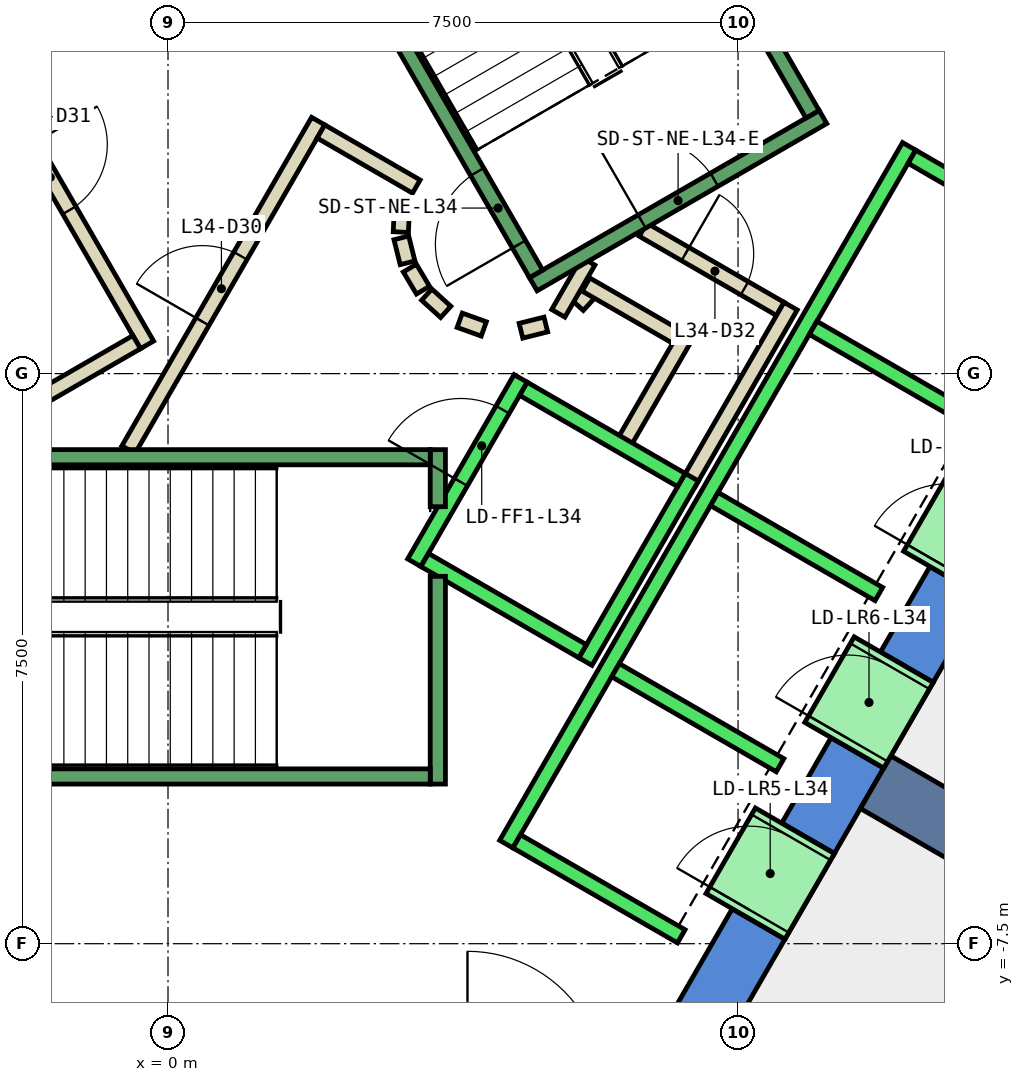
"""IFC4 building model, lengths in metres.
Left out: names, types, materials, properties, quantities, classifications, styles, units other than length and angle.
Written with IfcOpenShell. Run it as: python <this file> out.ifc"""

import sys

from ifc_helpers import new_model, si_unit, direction, frame, frame_2d, origin, place, context, subcontext, project, spatial, polyline, rectangle, outline, extrude, element, fill, save


model = new_model("IFC4")
c1 = context("Model", 3, precision=1e-05, world=origin(), true_north=direction((0.0, 1.0)))
c2 = subcontext(c1, "Body", "Model", "MODEL_VIEW")
j1 = project(units=[si_unit("LENGTHUNIT", "METRE"), si_unit("PLANEANGLEUNIT", "RADIAN")], contexts=[c1])
p1 = place(None, origin())
s1 = spatial("IfcSite", under=j1, at=p1, CompositionType="ELEMENT")
p2 = place(p1, origin())
s2 = spatial("IfcBuilding", under=s1, at=p2, CompositionType="ELEMENT")
p3 = place(p2, frame((0.0, 0.0, 155.0)))
s3 = spatial("IfcBuildingStorey", under=s2, at=p3, CompositionType="ELEMENT", Elevation=155.0)
p4 = place(p3, frame((0.0, 0.0, -0.4)))
e1 = element("IfcWall", 1, at=p4, inside=s3, PredefinedType="SHEAR", context=c2, shape_type="SweptSolid", body=[
    extrude(outline(polyline([(8.517, 11.748), (7.824, 11.348), (12.933, 2.5), (13.856, 2.5), (8.517, 11.748)])), origin(), (0.0, 0.0, 1.0), 4.2),
])
p5 = place(p3, frame((0.0, 0.0, -0.4)))
e2 = element("IfcWall", 2, at=p5, inside=s3, PredefinedType="SHEAR", context=c2, shape_type="SweptSolid", body=[
    extrude(outline(polyline([(8.117, -7.44), (7.424, -7.04), (6.466, -8.7), (6.928, -9.5), (8.117, -7.44)])), origin(), (0.0, 0.0, 1.0), 4.2),
])
p6 = place(p3, frame((0.0, 0.0, -0.4)))
e3 = element("IfcWall", 3, at=p6, inside=s3, PredefinedType="SHEAR", context=c2, shape_type="SweptSolid", body=[
    extrude(outline(polyline([(9.417, -5.189), (8.724, -4.789), (8.075, -5.914), (8.767, -6.314), (9.417, -5.189)])), origin(), (0.0, 0.0, 1.0), 4.2),
])
p7 = place(p3, frame((0.0, 0.0, -0.4)))
e4 = element("IfcWall", 4, at=p7, inside=s3, PredefinedType="SHEAR", context=c2, shape_type="SweptSolid", body=[
    extrude(outline(polyline([(10.717, -2.937), (10.025, -2.537), (9.374, -3.663), (10.067, -4.063), (10.717, -2.937)])), origin(), (0.0, 0.0, 1.0), 4.2),
])
p8 = place(p3, frame((0.0, 0.0, 3.6)))
e5 = element("IfcWall", 5, at=p8, inside=s3, PredefinedType="SHEAR", context=c2, shape_type="SweptSolid", body=[
    extrude(outline(polyline([(8.767, -6.314), (8.075, -5.914), (7.424, -7.04), (8.117, -7.44), (8.767, -6.314)])), origin(), (0.0, 0.0, 1.0), 0.2),
])
p9 = place(p3, frame((0.0, 0.0, 3.6)))
e6 = element("IfcWall", 6, at=p9, inside=s3, PredefinedType="SHEAR", context=c2, shape_type="SweptSolid", body=[
    extrude(outline(polyline([(10.067, -4.063), (9.374, -3.663), (8.724, -4.789), (9.417, -5.189), (10.067, -4.063)])), origin(), (0.0, 0.0, 1.0), 0.2),
])
p10 = place(p3, frame((0.0, 0.0, 3.6)))
e7 = element("IfcWall", 7, at=p10, inside=s3, PredefinedType="SHEAR", context=c2, shape_type="SweptSolid", body=[
    extrude(outline(polyline([(11.367, -1.811), (10.675, -1.411), (10.025, -2.537), (10.717, -2.937), (11.367, -1.811)])), origin(), (0.0, 0.0, 1.0), 0.2),
])
p11 = place(p3, frame((9.31, -5.375, -0.4), z_axis=(0.0, 0.0, 1.0), x_axis=(0.866017533419, -0.500013631625, 0.0)))
e8 = element("IfcWall", 8, at=p11, inside=s3, PredefinedType="SHEAR", context=c2, shape_type="SweptSolid", body=[
    extrude(rectangle(XDim=9.0, YDim=0.8, at=frame_2d((4.5, 0.0))), origin(), (0.0, 0.0, 1.0), 4.2),
])
p12 = place(p3, frame((5.39, 0.898, 0.0), z_axis=(0.0, 0.0, 1.0), x_axis=(0.673828488714, 0.738887791073, 0.0)))
e9 = element("IfcWall", 9, at=p12, inside=s3, PredefinedType="PARTITIONING", context=c2, shape_type="SweptSolid", body=[
    extrude(rectangle(XDim=0.263, YDim=0.2, at=frame_2d((0.131, 0.0))), origin(), (0.0, 0.0, 1.0), 3.8),
])
p13 = place(p3, frame((5.499, 1.172, 0.0), z_axis=(0.0, 0.0, 1.0), x_axis=(0.866333505267, -0.499465972466, 0.0)))
e10 = element("IfcWall", 10, at=p13, inside=s3, PredefinedType="PARTITIONING", context=c2, shape_type="SweptSolid", body=[
    extrude(rectangle(XDim=1.374, YDim=0.2, at=frame_2d((0.687, 0.0))), origin(), (0.0, 0.0, 1.0), 3.8),
])
p14 = place(p3, frame((6.826, 0.522, 0.0), z_axis=(0.0, 0.0, 1.0), x_axis=(-0.500016722714, -0.866015748706, 0.0)))
e11 = element("IfcWall", 11, at=p14, inside=s3, PredefinedType="PARTITIONING", context=c2, shape_type="SweptSolid", body=[
    extrude(rectangle(XDim=1.7, YDim=0.2, at=frame_2d((0.85, 0.0))), origin(), (0.0, 0.0, 1.0), 3.8),
])
p15 = place(p3, frame((6.25, 1.894, 0.0), z_axis=(0.0, 0.0, 1.0), x_axis=(0.866043184279, -0.499969202016, 0.0)))
e12 = element("IfcWall", 12, at=p15, inside=s3, PredefinedType="PARTITIONING", context=c2, shape_type="SweptSolid", body=[
    extrude(rectangle(XDim=2.084, YDim=0.2, at=frame_2d((1.042, 0.0))), origin(), (0.0, 0.0, 1.0), 3.8),
])
p16 = place(p15, frame((0.642, 0.0, 0.0)))
e13 = element("IfcOpeningElement", 13, at=p16, cuts=e12, PredefinedType="OPENING", context=c2, shape_type="SweptSolid", body=[
    extrude(rectangle(XDim=0.9, YDim=2.1, at=frame_2d((0.45, 1.05))), frame((0.0, 0.11, 0.0), z_axis=(0.0, -1.0, 0.0), x_axis=(1.0, 0.0, 0.0)), (0.0, 0.0, 1.0), 0.22),
])
p17 = place(p3, frame((8.192, 0.888, 0.0), z_axis=(0.0, 0.0, 1.0), x_axis=(-0.499940625693, -0.866059680843, 0.0)))
e14 = element("IfcWall", 14, at=p17, inside=s3, PredefinedType="PARTITIONING", context=c2, shape_type="SweptSolid", body=[
    extrude(rectangle(XDim=2.68, YDim=0.2, at=frame_2d((1.34, 0.0))), origin(), (0.0, 0.0, 1.0), 3.8),
])
p18 = place(p3, frame((5.135, 0.793, 0.0), z_axis=(0.0, 0.0, 1.0), x_axis=(0.499526442893, 0.866298639529, 0.0)))
e15 = element("IfcWall", 15, at=p18, inside=s3, PredefinedType="PARTITIONING", context=c2, shape_type="SweptSolid", body=[
    extrude(rectangle(XDim=0.791, YDim=0.2, at=frame_2d((0.396, 0.0))), origin(), (0.0, 0.0, 1.0), 3.8),
])
p19 = place(p3, frame((-0.52, -1.0, 0.0), z_axis=(0.0, 0.0, 1.0), x_axis=(0.50011622646, 0.865958290007, 0.0)))
e16 = element("IfcWall", 16, at=p19, inside=s3, PredefinedType="PARTITIONING", context=c2, shape_type="SweptSolid", body=[
    extrude(rectangle(XDim=4.991, YDim=0.2, at=frame_2d((2.496, 0.0))), origin(), (0.0, 0.0, 1.0), 3.8),
])
p20 = place(p19, frame((1.945, 0.0, 0.0)))
e17 = element("IfcOpeningElement", 17, at=p20, cuts=e16, PredefinedType="OPENING", context=c2, shape_type="SweptSolid", body=[
    extrude(rectangle(XDim=1.0, YDim=2.1, at=frame_2d((0.5, 1.05))), frame((0.0, 0.11, 0.0), z_axis=(0.0, -1.0, 0.0), x_axis=(1.0, 0.0, 0.0)), (0.0, 0.0, 1.0), 0.22),
])
p21 = place(p3, frame((2.012, 3.186, 0.0), z_axis=(0.0, 0.0, 1.0), x_axis=(0.865891012941, -0.500232699559, 0.0)))
e18 = element("IfcWall", 18, at=p21, inside=s3, PredefinedType="PARTITIONING", context=c2, shape_type="SweptSolid", body=[
    extrude(rectangle(XDim=1.449, YDim=0.2, at=frame_2d((0.725, 0.0))), origin(), (0.0, 0.0, 1.0), 3.8),
])
p22 = place(p3, frame((3.079, 2.199, 0.0), z_axis=(0.0, 0.0, 1.0), x_axis=(-0.047771483479, -0.998858290933, 0.0)))
e19 = element("IfcWall", 19, at=p22, inside=s3, PredefinedType="PARTITIONING", context=c2, shape_type="SweptSolid", body=[
    extrude(rectangle(XDim=0.337, YDim=0.2, at=frame_2d((0.169, 0.0))), origin(), (0.0, 0.0, 1.0), 3.8),
])
p23 = place(p3, frame((3.07, 1.786, 0.0), z_axis=(0.0, 0.0, 1.0), x_axis=(0.242705583207, -0.970099994784, 0.0)))
e20 = element("IfcWall", 20, at=p23, inside=s3, PredefinedType="PARTITIONING", context=c2, shape_type="SweptSolid", body=[
    extrude(rectangle(XDim=0.338, YDim=0.2, at=frame_2d((0.169, 0.0))), origin(), (0.0, 0.0, 1.0), 3.8),
])
for number, where, z_axis, x_axis in (
    (21, (3.182, 1.388, 0.0), (0.0, 0.0, 1.0), (0.512, -0.859, 0.0)),
    (22, (3.404, 1.039, 0.0), (0.0, 0.0, 1.0), (0.74, -0.672, 0.0)),
):
    element("IfcWall", number, at=place(p3, frame(where, z_axis=z_axis, x_axis=x_axis)), inside=s3, PredefinedType="PARTITIONING", context=c2, shape_type="SweptSolid", body=[
        extrude(rectangle(XDim=0.338, YDim=0.2, at=frame_2d((0.169, 0.0))), origin(), (0.0, 0.0, 1.0), 3.8),
    ])
p24 = place(p3, frame((3.838, 0.702, 0.0), z_axis=(0.0, 0.0, 1.0), x_axis=(0.941035081519, -0.338308993895, 0.0)))
e23 = element("IfcWall", 23, at=p24, inside=s3, PredefinedType="PARTITIONING", context=c2, shape_type="SweptSolid", body=[
    extrude(rectangle(XDim=0.337, YDim=0.2, at=frame_2d((0.168, 0.0))), origin(), (0.0, 0.0, 1.0), 3.8),
])
p25 = place(p3, frame((4.644, 0.564, 0.0), z_axis=(0.0, 0.0, 1.0), x_axis=(0.969929076366, 0.243387729394, 0.0)))
e24 = element("IfcWall", 24, at=p25, inside=s3, PredefinedType="PARTITIONING", context=c2, shape_type="SweptSolid", body=[
    extrude(rectangle(XDim=0.337, YDim=0.2, at=frame_2d((0.168, 0.0))), origin(), (0.0, 0.0, 1.0), 3.8),
])
p26 = place(p3, frame((-2.771, 4.7, 0.0), z_axis=(0.0, 0.0, 1.0), x_axis=(0.499969479948, -0.866043023828, 0.0)))
e25 = element("IfcWall", 25, at=p26, inside=s3, PredefinedType="PARTITIONING", context=c2, shape_type="SweptSolid", body=[
    extrude(rectangle(XDim=4.99, YDim=0.2, at=frame_2d((2.495, 0.0))), origin(), (0.0, 0.0, 1.0), 3.8),
])
p27 = place(p26, frame((1.945, 0.0, 0.0)))
e26 = element("IfcOpeningElement", 26, at=p27, cuts=e25, PredefinedType="OPENING", context=c2, shape_type="SweptSolid", body=[
    extrude(rectangle(XDim=1.0, YDim=2.1, at=frame_2d((0.5, 1.05))), frame((0.0, 0.11, 0.0), z_axis=(0.0, -1.0, 0.0), x_axis=(1.0, 0.0, 0.0)), (0.0, 0.0, 1.0), 0.22),
])
p28 = place(p3, frame((-0.412, 0.414, 0.0), z_axis=(0.0, 0.0, 1.0), x_axis=(-0.866017369001, -0.500013916395, 0.0)))
e27 = element("IfcWall", 27, at=p28, inside=s3, PredefinedType="PARTITIONING", context=c2, shape_type="SweptSolid", body=[
    extrude(rectangle(XDim=1.45, YDim=0.2, at=frame_2d((0.725, 0.0))), origin(), (0.0, 0.0, 1.0), 3.8),
])
p29 = place(p3, frame((12.401, -7.621, 0.0), z_axis=(0.0, 0.0, 1.0), x_axis=(-0.499983724212, -0.866034800411, 0.0)))
e28 = element("IfcWall", 28, at=p29, inside=s3, PredefinedType="PARTITIONING", context=c2, shape_type="SweptSolid", body=[
    extrude(rectangle(XDim=9.302, YDim=0.2, at=frame_2d((4.651, 0.0))), origin(), (0.0, 0.0, 1.0), 3.8),
])
p30 = place(p3, frame((3.24, -2.488, 0.0), z_axis=(0.0, 0.0, 1.0), x_axis=(0.49994636267, 0.866056369097, 0.0)))
e29 = element("IfcWall", 29, at=p30, inside=s3, PredefinedType="STANDARD", context=c2, shape_type="SweptSolid", body=[
    extrude(rectangle(XDim=2.8, YDim=0.2, at=frame_2d((1.4, 0.0))), origin(), (0.0, 0.0, 1.0), 3.8),
])
p31 = place(p30, frame((1.225, 0.0, 0.0)))
e30 = element("IfcOpeningElement", 30, at=p31, cuts=e29, PredefinedType="OPENING", context=c2, shape_type="SweptSolid", body=[
    extrude(rectangle(XDim=1.1, YDim=2.1, at=frame_2d((0.55, 1.05))), frame((0.0, 0.11, 0.0), z_axis=(0.0, -1.0, 0.0), x_axis=(1.0, 0.0, 0.0)), (0.0, 0.0, 1.0), 0.22),
])
p32 = place(p3, frame((5.492, -3.788, 0.0), z_axis=(0.0, 0.0, 1.0), x_axis=(0.500011755427, 0.866018616679, 0.0)))
e31 = element("IfcWall", 31, at=p32, inside=s3, PredefinedType="STANDARD", context=c2, shape_type="SweptSolid", body=[
    extrude(rectangle(XDim=2.8, YDim=0.2, at=frame_2d((1.4, 0.0))), origin(), (0.0, 0.0, 1.0), 3.8),
])
p33 = place(p3, frame((3.377, -2.452, 0.0), z_axis=(0.0, 0.0, 1.0), x_axis=(0.865955154139, -0.50012165622, 0.0)))
e32 = element("IfcWall", 32, at=p33, inside=s3, PredefinedType="STANDARD", context=c2, shape_type="SweptSolid", body=[
    extrude(rectangle(XDim=2.4, YDim=0.2, at=frame_2d((1.2, 0.0))), origin(), (0.0, 0.0, 1.0), 3.8),
])
p34 = place(p3, frame((4.677, -0.2, 0.0), z_axis=(0.0, 0.0, 1.0), x_axis=(0.865973769406, -0.500089422704, 0.0)))
e33 = element("IfcWall", 33, at=p34, inside=s3, PredefinedType="STANDARD", context=c2, shape_type="SweptSolid", body=[
    extrude(rectangle(XDim=2.399, YDim=0.2, at=frame_2d((1.2, 0.0))), origin(), (0.0, 0.0, 1.0), 3.8),
])
p35 = place(p3, frame((4.451, -6.19, 0.0), z_axis=(0.0, 0.0, 1.0), x_axis=(0.50000090737, 0.866024879913, 0.0)))
e34 = element("IfcWall", 34, at=p35, inside=s3, PredefinedType="STANDARD", context=c2, shape_type="SweptSolid", body=[
    extrude(rectangle(XDim=10.6, YDim=0.2, at=frame_2d((5.3, 0.0))), origin(), (0.0, 0.0, 1.0), 3.8),
])
for number, where, z_axis, x_axis in (
    (35, (4.588, -6.153, 0.0), (0.0, 0.0, 1.0), (0.866, -0.5, 0.0)),
    (36, (5.888, -3.902, 0.0), (0.0, 0.0, 1.0), (0.866, -0.5, 0.0)),
    (37, (7.188, -1.65, 0.0), (0.0, 0.0, 1.0), (0.866, -0.5, 0.0)),
    (38, (8.488, 0.602, 0.0), (0.0, 0.0, 1.0), (0.866, -0.5, 0.0)),
):
    element("IfcWall", number, at=place(p3, frame(where, z_axis=z_axis, x_axis=x_axis)), inside=s3, PredefinedType="STANDARD", context=c2, shape_type="SweptSolid", body=[
        extrude(rectangle(XDim=2.5, YDim=0.2, at=frame_2d((1.25, 0.0))), origin(), (0.0, 0.0, 1.0), 3.8),
    ])
p36 = place(p3, frame((9.788, 2.853, 0.0), z_axis=(0.0, 0.0, 1.0), x_axis=(0.865998541277, -0.500046524342, 0.0)))
e39 = element("IfcWall", 39, at=p36, inside=s3, PredefinedType="STANDARD", context=c2, shape_type="SweptSolid", body=[
    extrude(rectangle(XDim=2.5, YDim=0.2, at=frame_2d((1.25, 0.0))), origin(), (0.0, 0.0, 1.0), 3.8),
])
p37 = place(p3, frame((7.598, -7.14, 0.0), z_axis=(0.0, 0.0, 1.0), x_axis=(0.500362116554, 0.865816234728, 0.0)))
e40 = element("IfcWall", 40, at=p37, inside=s3, PredefinedType="STANDARD", context=c2, shape_type="SweptSolid", body=[
    extrude(rectangle(XDim=1.299, YDim=1.2, at=frame_2d((0.65, 0.0))), origin(), (0.0, 0.0, 1.0), 2.4),
])
p38 = place(p37, frame((0.1, 0.0, 0.0)))
e41 = element("IfcOpeningElement", 41, at=p38, cuts=e40, PredefinedType="OPENING", context=c2, shape_type="SweptSolid", body=[
    extrude(rectangle(XDim=1.1, YDim=2.3, at=frame_2d((0.55, 1.15))), frame((0.0, 0.61, 0.0), z_axis=(0.0, -1.0, 0.0), x_axis=(1.0, 0.0, 0.0)), (0.0, 0.0, 1.0), 1.22),
])
p39 = place(p3, frame((8.898, -4.889, 0.0), z_axis=(0.0, 0.0, 1.0), x_axis=(0.500036693733, 0.866004217611, 0.0)))
e42 = element("IfcWall", 42, at=p39, inside=s3, PredefinedType="STANDARD", context=c2, shape_type="SweptSolid", body=[
    extrude(rectangle(XDim=1.3, YDim=1.2, at=frame_2d((0.65, 0.0))), origin(), (0.0, 0.0, 1.0), 2.4),
])
p40 = place(p39, frame((0.1, 0.0, 0.0)))
e43 = element("IfcOpeningElement", 43, at=p40, cuts=e42, PredefinedType="OPENING", context=c2, shape_type="SweptSolid", body=[
    extrude(rectangle(XDim=1.1, YDim=2.3, at=frame_2d((0.55, 1.15))), frame((0.0, 0.61, 0.0), z_axis=(0.0, -1.0, 0.0), x_axis=(1.0, 0.0, 0.0)), (0.0, 0.0, 1.0), 1.22),
])
p41 = place(p3, frame((10.198, -2.637, 0.0), z_axis=(0.0, 0.0, 1.0), x_axis=(0.49989585183, 0.866085525409, 0.0)))
e44 = element("IfcWall", 44, at=p41, inside=s3, PredefinedType="STANDARD", context=c2, shape_type="SweptSolid", body=[
    extrude(rectangle(XDim=1.3, YDim=1.2, at=frame_2d((0.65, 0.0))), origin(), (0.0, 0.0, 1.0), 2.4),
])
p42 = place(p41, frame((0.1, 0.0, 0.0)))
e45 = element("IfcOpeningElement", 45, at=p42, cuts=e44, PredefinedType="OPENING", context=c2, shape_type="SweptSolid", body=[
    extrude(rectangle(XDim=1.1, YDim=2.3, at=frame_2d((0.55, 1.15))), frame((0.0, 0.61, 0.0), z_axis=(0.0, -1.0, 0.0), x_axis=(1.0, 0.0, 0.0)), (0.0, 0.0, 1.0), 1.22),
])
p43 = place(p3, frame((3.55, -2.667, 0.0), z_axis=(0.0, 0.0, 1.0), x_axis=(0.0, -1.0, 0.0)))
e46 = element("IfcWall", 46, at=p43, inside=s3, PredefinedType="STANDARD", context=c2, shape_type="SweptSolid", body=[
    extrude(rectangle(XDim=2.733, YDim=0.2, at=frame_2d((1.366, 0.0))), origin(), (0.0, 0.0, 1.0), 3.8),
])
p44 = place(p3, frame((3.55, -1.0, 0.0), z_axis=(0.0, 0.0, 1.0), x_axis=(0.0, -1.0, 0.0)))
e47 = element("IfcWall", 47, at=p44, inside=s3, PredefinedType="STANDARD", context=c2, shape_type="SweptSolid", body=[
    extrude(rectangle(XDim=0.751, YDim=0.2, at=frame_2d((0.375, 0.0))), origin(), (0.0, 0.0, 1.0), 3.8),
])
p45 = place(p3, frame((-3.45, -1.1, 0.0), z_axis=(0.0, 0.0, 1.0), x_axis=(1.0, 0.0, 0.0)))
e48 = element("IfcWall", 48, at=p45, inside=s3, PredefinedType="STANDARD", context=c2, shape_type="SweptSolid", body=[
    extrude(rectangle(XDim=6.9, YDim=0.2, at=frame_2d((3.45, 0.0))), origin(), (0.0, 0.0, 1.0), 3.8),
])
p46 = place(p45, frame((0.45, 0.0, 0.0)))
e49 = element("IfcOpeningElement", 49, at=p46, cuts=e48, PredefinedType="OPENING", context=c2, shape_type="SweptSolid", body=[
    extrude(rectangle(XDim=1.1, YDim=2.2, at=frame_2d((0.55, 1.1))), frame((0.0, 0.11, 0.0), z_axis=(0.0, -1.0, 0.0), x_axis=(1.0, 0.0, 0.0)), (0.0, 0.0, 1.0), 0.22),
])
p47 = place(p3, frame((-3.45, -5.3, 0.0), z_axis=(0.0, 0.0, 1.0), x_axis=(1.0, 0.0, 0.0)))
e50 = element("IfcWall", 50, at=p47, inside=s3, PredefinedType="STANDARD", context=c2, shape_type="SweptSolid", body=[
    extrude(rectangle(XDim=6.9, YDim=0.2, at=frame_2d((3.45, 0.0))), origin(), (0.0, 0.0, 1.0), 3.8),
])
p48 = place(p3, frame((4.806, 1.176, 0.0), z_axis=(0.0, 0.0, 1.0), x_axis=(0.866059941101, 0.499940174841, 0.0)))
e51 = element("IfcWall", 51, at=p48, inside=s3, PredefinedType="STANDARD", context=c2, shape_type="SweptSolid", body=[
    extrude(rectangle(XDim=4.4, YDim=0.2, at=frame_2d((2.2, 0.0))), origin(), (0.0, 0.0, 1.0), 3.8),
])
p49 = place(p48, frame((1.65, 0.0, 0.0)))
e52 = element("IfcOpeningElement", 52, at=p49, cuts=e51, PredefinedType="OPENING", context=c2, shape_type="SweptSolid", body=[
    extrude(rectangle(XDim=1.1, YDim=2.2, at=frame_2d((0.55, 1.1))), frame((0.0, 0.11, 0.0), z_axis=(0.0, -1.0, 0.0), x_axis=(1.0, 0.0, 0.0)), (0.0, 0.0, 1.0), 0.22),
])
p50 = place(p3, frame((4.843, 1.312, 0.0), z_axis=(0.0, 0.0, 1.0), x_axis=(-0.499963383562, 0.866046543262, 0.0)))
e53 = element("IfcWall", 53, at=p50, inside=s3, PredefinedType="STANDARD", context=c2, shape_type="SweptSolid", body=[
    extrude(rectangle(XDim=6.9, YDim=0.2, at=frame_2d((3.45, 0.0))), origin(), (0.0, 0.0, 1.0), 3.8),
])
p51 = place(p50, frame((0.45, 0.0, 0.0)))
e54 = element("IfcOpeningElement", 54, at=p51, cuts=e53, PredefinedType="OPENING", context=c2, shape_type="SweptSolid", body=[
    extrude(rectangle(XDim=1.1, YDim=2.2, at=frame_2d((0.55, 1.1))), frame((0.0, 0.11, 0.0), z_axis=(0.0, -1.0, 0.0), x_axis=(1.0, 0.0, 0.0)), (0.0, 0.0, 1.0), 0.22),
])
p52 = place(p3, frame((8.48, 3.412, 0.0), z_axis=(0.0, 0.0, 1.0), x_axis=(-0.499978703459, 0.866037698999, 0.0)))
e55 = element("IfcWall", 55, at=p52, inside=s3, PredefinedType="STANDARD", context=c2, shape_type="SweptSolid", body=[
    extrude(rectangle(XDim=6.9, YDim=0.2, at=frame_2d((3.45, 0.0))), origin(), (0.0, 0.0, 1.0), 3.8),
])
p53 = place(p3, frame((-1.393, 7.288, 0.0), z_axis=(0.0, 0.0, 1.0), x_axis=(-0.499963383562, -0.866046543262, 0.0)))
e56 = element("IfcWall", 56, at=p53, inside=s3, PredefinedType="STANDARD", context=c2, shape_type="SweptSolid", body=[
    extrude(rectangle(XDim=6.9, YDim=0.2, at=frame_2d((3.45, 0.0))), origin(), (0.0, 0.0, 1.0), 3.8),
])
p54 = place(p53, frame((0.45, 0.0, 0.0)))
e57 = element("IfcOpeningElement", 57, at=p54, cuts=e56, PredefinedType="OPENING", context=c2, shape_type="SweptSolid", body=[
    extrude(rectangle(XDim=1.1, YDim=2.2, at=frame_2d((0.55, 1.1))), frame((0.0, 0.11, 0.0), z_axis=(0.0, -1.0, 0.0), x_axis=(1.0, 0.0, 0.0)), (0.0, 0.0, 1.0), 0.22),
])
p55 = place(p20, origin())
e58 = element("IfcDoor", 58, at=p55, inside=s3, OperationType="SINGLE_SWING_LEFT", PredefinedType="DOOR", context=c2, shape_type="SweptSolid", body=[
    extrude(rectangle(XDim=1.0, YDim=2.1, at=frame_2d((0.5, 1.05))), frame((0.0, 0.025, 0.0), z_axis=(0.0, -1.0, 0.0), x_axis=(1.0, 0.0, 0.0)), (0.0, 0.0, 1.0), 0.05),
])
fill(e17, e58)
p56 = place(p27, origin())
e59 = element("IfcDoor", 59, at=p56, inside=s3, OperationType="SINGLE_SWING_RIGHT", PredefinedType="DOOR", context=c2, shape_type="SweptSolid", body=[
    extrude(rectangle(XDim=1.0, YDim=2.1, at=frame_2d((0.5, 1.05))), frame((0.0, 0.025, 0.0), z_axis=(0.0, -1.0, 0.0), x_axis=(1.0, 0.0, 0.0)), (0.0, 0.0, 1.0), 0.05),
])
fill(e26, e59)
p57 = place(p16, origin())
e60 = element("IfcDoor", 60, at=p57, inside=s3, OperationType="SINGLE_SWING_LEFT", PredefinedType="DOOR", context=c2, shape_type="SweptSolid", body=[
    extrude(rectangle(XDim=0.9, YDim=2.1, at=frame_2d((0.45, 1.05))), frame((0.0, 0.025, 0.0), z_axis=(0.0, -1.0, 0.0), x_axis=(1.0, 0.0, 0.0)), (0.0, 0.0, 1.0), 0.05),
])
fill(e13, e60)
p58 = place(p38, origin())
e61 = element("IfcDoor", 61, at=p58, inside=s3, OperationType="SLIDING_TO_LEFT", PredefinedType="DOOR", context=c2, shape_type="SweptSolid", body=[
    extrude(rectangle(XDim=1.1, YDim=2.3, at=frame_2d((0.55, 1.15))), frame((0.0, 0.025, 0.0), z_axis=(0.0, -1.0, 0.0), x_axis=(1.0, 0.0, 0.0)), (0.0, 0.0, 1.0), 0.05),
])
fill(e41, e61)
p59 = place(p40, origin())
e62 = element("IfcDoor", 62, at=p59, inside=s3, OperationType="SLIDING_TO_LEFT", PredefinedType="DOOR", context=c2, shape_type="SweptSolid", body=[
    extrude(rectangle(XDim=1.1, YDim=2.3, at=frame_2d((0.55, 1.15))), frame((0.0, 0.025, 0.0), z_axis=(0.0, -1.0, 0.0), x_axis=(1.0, 0.0, 0.0)), (0.0, 0.0, 1.0), 0.05),
])
fill(e43, e62)
p60 = place(p31, origin())
e63 = element("IfcDoor", 63, at=p60, inside=s3, OperationType="SLIDING_TO_LEFT", PredefinedType="DOOR", context=c2, shape_type="SweptSolid", body=[
    extrude(rectangle(XDim=1.1, YDim=2.1, at=frame_2d((0.55, 1.05))), frame((0.0, 0.025, 0.0), z_axis=(0.0, -1.0, 0.0), x_axis=(1.0, 0.0, 0.0)), (0.0, 0.0, 1.0), 0.05),
])
fill(e30, e63)
p61 = place(p51, origin())
e64 = element("IfcDoor", 64, at=p61, inside=s3, OperationType="SINGLE_SWING_LEFT", PredefinedType="DOOR", context=c2, shape_type="SweptSolid", body=[
    extrude(rectangle(XDim=1.1, YDim=2.2, at=frame_2d((0.55, 1.1))), frame((0.0, 0.025, 0.0), z_axis=(0.0, -1.0, 0.0), x_axis=(1.0, 0.0, 0.0)), (0.0, 0.0, 1.0), 0.05),
])
fill(e54, e64)
p62 = place(p49, origin())
e65 = element("IfcDoor", 65, at=p62, inside=s3, OperationType="SINGLE_SWING_LEFT", PredefinedType="DOOR", context=c2, shape_type="SweptSolid", body=[
    extrude(rectangle(XDim=1.1, YDim=2.2, at=frame_2d((0.55, 1.1))), frame((0.0, 0.025, 0.0), z_axis=(0.0, -1.0, 0.0), x_axis=(1.0, 0.0, 0.0)), (0.0, 0.0, 1.0), 0.05),
])
fill(e52, e65)
save(model, sys.argv[1])
